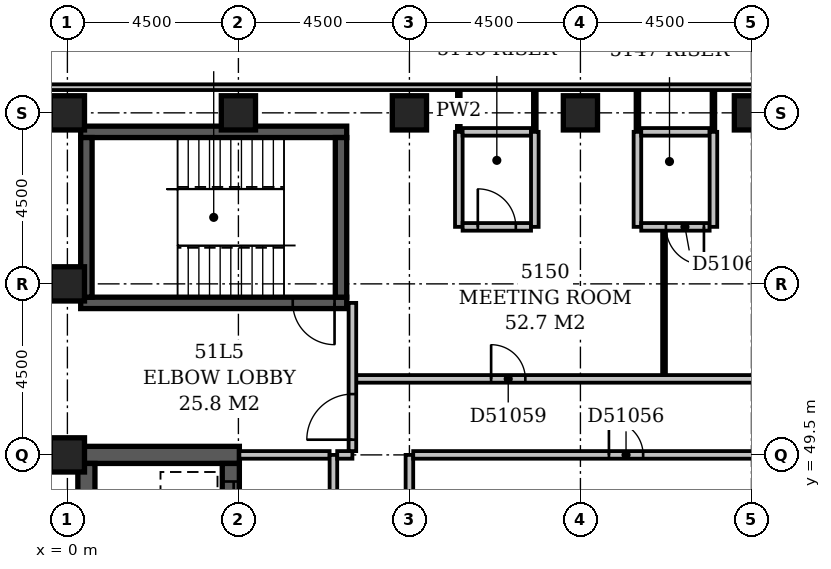
"""IFC4 building model, lengths in metres.
Left out: names, types, materials, properties, quantities, classifications, styles, units other than length and angle.
Written with IfcOpenShell. Run it as: python <this file> out.ifc"""

import sys

from ifc_helpers import new_model, si_unit, direction, frame, frame_2d, origin, origin_2d, place, context, subcontext, project, spatial, rectangle, extrude, element, fill, save


model = new_model("IFC4")
c1 = context("Model", 3, precision=1e-05, world=origin(), true_north=direction((0.0, 1.0)))
c2 = subcontext(c1, "Body", "Model", "MODEL_VIEW")
j1 = project(units=[si_unit("LENGTHUNIT", "METRE"), si_unit("PLANEANGLEUNIT", "RADIAN")], contexts=[c1])
p1 = place(None, origin())
s1 = spatial("IfcSite", under=j1, at=p1, CompositionType="ELEMENT")
p2 = place(p1, origin())
s2 = spatial("IfcBuilding", under=s1, at=p2, CompositionType="ELEMENT")
p3 = place(p2, frame((0.0, 0.0, 200.6)))
s3 = spatial("IfcBuildingStorey", under=s2, at=p3, CompositionType="ELEMENT", Elevation=200.6)
p4 = place(p3, frame((0.275, 49.5, -0.3), z_axis=(0.0, 0.0, 1.0), x_axis=(1.0, 0.0, 0.0)))
e1 = element("IfcWall", 1, at=p4, inside=s3, PredefinedType="SHEAR", context=c2, shape_type="SweptSolid", body=[
    extrude(rectangle(XDim=4.25, YDim=0.45, at=frame_2d((2.125, 0.0))), origin(), (0.0, 0.0, 1.0), 3.6),
])
p5 = place(p3, frame((0.35, 53.5, -0.3), z_axis=(0.0, 0.0, 1.0), x_axis=(1.0, 0.0, 0.0)))
e2 = element("IfcWall", 2, at=p5, inside=s3, PredefinedType="SHEAR", context=c2, shape_type="SweptSolid", body=[
    extrude(rectangle(XDim=7.0, YDim=0.3, at=frame_2d((3.5, 0.0))), origin(), (0.0, 0.0, 1.0), 3.6),
])
p6 = place(p5, frame((5.58, 0.0, 0.3)))
e3 = element("IfcOpeningElement", 3, at=p6, cuts=e2, PredefinedType="OPENING", context=c2, shape_type="SweptSolid", body=[
    extrude(rectangle(XDim=1.1, YDim=2.1, at=frame_2d((0.55, 1.05))), frame((0.0, 0.162, 0.0), z_axis=(0.0, -1.0, 0.0), x_axis=(1.0, 0.0, 0.0)), (0.0, 0.0, 1.0), 0.324),
])
p7 = place(p3, frame((0.35, 58.0, -0.3), z_axis=(0.0, 0.0, 1.0), x_axis=(1.0, 0.0, 0.0)))
e4 = element("IfcWall", 4, at=p7, inside=s3, PredefinedType="SHEAR", context=c2, shape_type="SweptSolid", body=[
    extrude(rectangle(XDim=7.0, YDim=0.3, at=frame_2d((3.5, 0.0))), origin(), (0.0, 0.0, 1.0), 3.6),
])
p8 = place(p3, frame((0.5, 27.15, -0.3), z_axis=(0.0, 0.0, 1.0), x_axis=(0.0, 1.0, 0.0)))
e5 = element("IfcWall", 5, at=p8, inside=s3, PredefinedType="SHEAR", context=c2, shape_type="SweptSolid", body=[
    extrude(rectangle(XDim=22.125, YDim=0.45, at=frame_2d((11.062, 0.0))), origin(), (0.0, 0.0, 1.0), 3.6),
])
p9 = place(p3, frame((0.5, 53.65, -0.3), z_axis=(0.0, 0.0, 1.0), x_axis=(0.0, 1.0, 0.0)))
e6 = element("IfcWall", 6, at=p9, inside=s3, PredefinedType="SHEAR", context=c2, shape_type="SweptSolid", body=[
    extrude(rectangle(XDim=4.2, YDim=0.3, at=frame_2d((2.1, 0.0))), origin(), (0.0, 0.0, 1.0), 3.6),
])
p10 = place(p3, frame((4.3, 27.15, -0.3), z_axis=(0.0, 0.0, 1.0), x_axis=(0.0, 1.0, 0.0)))
e7 = element("IfcWall", 7, at=p10, inside=s3, PredefinedType="SHEAR", context=c2, shape_type="SweptSolid", body=[
    extrude(rectangle(XDim=22.125, YDim=0.45, at=frame_2d((11.062, 0.0))), origin(), (0.0, 0.0, 1.0), 3.6),
])
p11 = place(p10, frame((3.05, 0.0, 0.3)))
e8 = element("IfcOpeningElement", 8, at=p11, cuts=e7, PredefinedType="OPENING", context=c2, shape_type="SweptSolid", body=[
    extrude(rectangle(XDim=1.1, YDim=2.1, at=frame_2d((0.55, 1.05))), frame((0.0, 0.237, 0.0), z_axis=(0.0, -1.0, 0.0), x_axis=(1.0, 0.0, 0.0)), (0.0, 0.0, 1.0), 0.474),
])
p12 = place(p10, frame((0.55, 0.0, 0.3)))
e9 = element("IfcOpeningElement", 9, at=p12, cuts=e7, PredefinedType="OPENING", context=c2, shape_type="SweptSolid", body=[
    extrude(rectangle(XDim=1.1, YDim=2.1, at=frame_2d((0.55, 1.05))), frame((0.0, 0.237, 0.0), z_axis=(0.0, -1.0, 0.0), x_axis=(1.0, 0.0, 0.0)), (0.0, 0.0, 1.0), 0.474),
])
p13 = place(p10, frame((20.55, 0.0, 0.3)))
e10 = element("IfcOpeningElement", 10, at=p13, cuts=e7, PredefinedType="OPENING", context=c2, shape_type="SweptSolid", body=[
    extrude(rectangle(XDim=1.1, YDim=2.1, at=frame_2d((0.55, 1.05))), frame((0.0, 0.237, 0.0), z_axis=(0.0, -1.0, 0.0), x_axis=(1.0, 0.0, 0.0)), (0.0, 0.0, 1.0), 0.474),
])
p14 = place(p10, frame((18.05, 0.0, 0.3)))
e11 = element("IfcOpeningElement", 11, at=p14, cuts=e7, PredefinedType="OPENING", context=c2, shape_type="SweptSolid", body=[
    extrude(rectangle(XDim=1.1, YDim=2.1, at=frame_2d((0.55, 1.05))), frame((0.0, 0.237, 0.0), z_axis=(0.0, -1.0, 0.0), x_axis=(1.0, 0.0, 0.0)), (0.0, 0.0, 1.0), 0.474),
])
p15 = place(p10, frame((15.55, 0.0, 0.3)))
e12 = element("IfcOpeningElement", 12, at=p15, cuts=e7, PredefinedType="OPENING", context=c2, shape_type="SweptSolid", body=[
    extrude(rectangle(XDim=1.1, YDim=2.1, at=frame_2d((0.55, 1.05))), frame((0.0, 0.237, 0.0), z_axis=(0.0, -1.0, 0.0), x_axis=(1.0, 0.0, 0.0)), (0.0, 0.0, 1.0), 0.474),
])
p16 = place(p10, frame((13.05, 0.0, 0.3)))
e13 = element("IfcOpeningElement", 13, at=p16, cuts=e7, PredefinedType="OPENING", context=c2, shape_type="SweptSolid", body=[
    extrude(rectangle(XDim=1.1, YDim=2.1, at=frame_2d((0.55, 1.05))), frame((0.0, 0.237, 0.0), z_axis=(0.0, -1.0, 0.0), x_axis=(1.0, 0.0, 0.0)), (0.0, 0.0, 1.0), 0.474),
])
p17 = place(p10, frame((10.55, 0.0, 0.3)))
e14 = element("IfcOpeningElement", 14, at=p17, cuts=e7, PredefinedType="OPENING", context=c2, shape_type="SweptSolid", body=[
    extrude(rectangle(XDim=1.1, YDim=2.1, at=frame_2d((0.55, 1.05))), frame((0.0, 0.237, 0.0), z_axis=(0.0, -1.0, 0.0), x_axis=(1.0, 0.0, 0.0)), (0.0, 0.0, 1.0), 0.474),
])
p18 = place(p10, frame((8.05, 0.0, 0.3)))
e15 = element("IfcOpeningElement", 15, at=p18, cuts=e7, PredefinedType="OPENING", context=c2, shape_type="SweptSolid", body=[
    extrude(rectangle(XDim=1.1, YDim=2.1, at=frame_2d((0.55, 1.05))), frame((0.0, 0.237, 0.0), z_axis=(0.0, -1.0, 0.0), x_axis=(1.0, 0.0, 0.0)), (0.0, 0.0, 1.0), 0.474),
])
p19 = place(p10, frame((5.55, 0.0, 0.3)))
e16 = element("IfcOpeningElement", 16, at=p19, cuts=e7, PredefinedType="OPENING", context=c2, shape_type="SweptSolid", body=[
    extrude(rectangle(XDim=1.1, YDim=2.1, at=frame_2d((0.55, 1.05))), frame((0.0, 0.237, 0.0), z_axis=(0.0, -1.0, 0.0), x_axis=(1.0, 0.0, 0.0)), (0.0, 0.0, 1.0), 0.474),
])
p20 = place(p3, frame((7.2, 53.65, -0.3), z_axis=(0.0, 0.0, 1.0), x_axis=(0.0, 1.0, 0.0)))
e17 = element("IfcWall", 17, at=p20, inside=s3, PredefinedType="SHEAR", context=c2, shape_type="SweptSolid", body=[
    extrude(rectangle(XDim=4.2, YDim=0.3, at=frame_2d((2.1, 0.0))), origin(), (0.0, 0.0, 1.0), 3.6),
])
for number, where, z_axis, x_axis in (
    (18, (0.0, 49.5, -0.3), (0.0, 0.0, 1.0), (1.0, 0.0, 0.0)),
    (19, (0.0, 54.0, -0.3), (0.0, 0.0, 1.0), (1.0, 0.0, 0.0)),
    (20, (0.0, 58.5, -0.3), (0.0, 0.0, 1.0), (1.0, 0.0, 0.0)),
    (21, (4.5, 58.5, -0.3), (0.0, 0.0, 1.0), (1.0, 0.0, 0.0)),
    (22, (9.0, 58.5, -0.3), (0.0, 0.0, 1.0), (1.0, 0.0, 0.0)),
    (23, (13.5, 58.5, -0.3), (0.0, 0.0, 1.0), (1.0, 0.0, 0.0)),
    (24, (18.0, 58.5, -0.3), (0.0, 0.0, 1.0), (1.0, 0.0, 0.0)),
):
    element("IfcColumn", number, at=place(p3, frame(where, z_axis=z_axis, x_axis=x_axis)), inside=s3, PredefinedType="COLUMN", context=c2, shape_type="SweptSolid", body=[
        extrude(rectangle(XDim=0.9, YDim=0.9, at=origin_2d()), origin(), (0.0, 0.0, 1.0), 3.6),
    ])
p21 = place(p3, frame((50.1, 59.175, 0.0), z_axis=(0.0, 0.0, 1.0), x_axis=(-1.0, 0.0, 0.0)))
e25 = element("IfcWall", 25, at=p21, inside=s3, PredefinedType="STANDARD", context=c2, shape_type="SweptSolid", body=[
    extrude(rectangle(XDim=50.85, YDim=0.15, at=frame_2d((25.425, 0.0))), origin(), (0.0, 0.0, 1.0), 2.7),
])
p22 = place(p3, frame((7.0, 34.6, 0.0), z_axis=(0.0, 0.0, 1.0), x_axis=(0.0, 1.0, 0.0)))
e26 = element("IfcWall", 26, at=p22, inside=s3, PredefinedType="PARTITIONING", context=c2, shape_type="SweptSolid", body=[
    extrude(rectangle(XDim=14.9, YDim=0.2, at=frame_2d((7.45, 0.0))), origin(), (0.0, 0.0, 1.0), 3.3),
])
p23 = place(p22, frame((2.8, 0.0, 0.0)))
e27 = element("IfcOpeningElement", 27, at=p23, cuts=e26, PredefinedType="OPENING", context=c2, shape_type="SweptSolid", body=[
    extrude(rectangle(XDim=1.2, YDim=2.1, at=frame_2d((0.6, 1.05))), frame((0.0, 0.112, 0.0), z_axis=(0.0, -1.0, 0.0), x_axis=(1.0, 0.0, 0.0)), (0.0, 0.0, 1.0), 0.224),
])
p24 = place(p22, frame((9.8, 0.0, 0.0)))
e28 = element("IfcOpeningElement", 28, at=p24, cuts=e26, PredefinedType="OPENING", context=c2, shape_type="SweptSolid", body=[
    extrude(rectangle(XDim=1.2, YDim=2.1, at=frame_2d((0.6, 1.05))), frame((0.0, 0.112, 0.0), z_axis=(0.0, -1.0, 0.0), x_axis=(1.0, 0.0, 0.0)), (0.0, 0.0, 1.0), 0.224),
])
p25 = place(p3, frame((4.525, 49.5, 0.0), z_axis=(0.0, 0.0, 1.0), x_axis=(1.0, 0.0, 0.0)))
e29 = element("IfcWall", 29, at=p25, inside=s3, PredefinedType="PARTITIONING", context=c2, shape_type="SweptSolid", body=[
    extrude(rectangle(XDim=2.375, YDim=0.2, at=frame_2d((1.188, 0.0))), origin(), (0.0, 0.0, 1.0), 3.3),
])
p26 = place(p3, frame((7.1, 49.5, 0.0), z_axis=(0.0, 0.0, 1.0), x_axis=(1.0, 0.0, 0.0)))
e30 = element("IfcWall", 30, at=p26, inside=s3, PredefinedType="PARTITIONING", context=c2, shape_type="SweptSolid", body=[
    extrude(rectangle(XDim=0.4, YDim=0.2, at=frame_2d((0.2, 0.0))), origin(), (0.0, 0.0, 1.0), 3.3),
])
p27 = place(p3, frame((7.5, 49.6, 0.0), z_axis=(0.0, 0.0, 1.0), x_axis=(0.0, 1.0, 0.0)))
e31 = element("IfcWall", 31, at=p27, inside=s3, PredefinedType="PARTITIONING", context=c2, shape_type="SweptSolid", body=[
    extrude(rectangle(XDim=3.9, YDim=0.2, at=frame_2d((1.95, 0.0))), origin(), (0.0, 0.0, 1.0), 3.3),
])
p28 = place(p27, frame((0.3, 0.0, 0.0)))
e32 = element("IfcOpeningElement", 32, at=p28, cuts=e31, PredefinedType="OPENING", context=c2, shape_type="SweptSolid", body=[
    extrude(rectangle(XDim=1.2, YDim=2.1, at=frame_2d((0.6, 1.05))), frame((0.0, 0.112, 0.0), z_axis=(0.0, -1.0, 0.0), x_axis=(1.0, 0.0, 0.0)), (0.0, 0.0, 1.0), 0.224),
])
p29 = place(p3, frame((9.0, 38.0, 0.0), z_axis=(0.0, 0.0, 1.0), x_axis=(0.0, 1.0, 0.0)))
e33 = element("IfcWall", 33, at=p29, inside=s3, PredefinedType="PARTITIONING", context=c2, shape_type="SweptSolid", body=[
    extrude(rectangle(XDim=11.5, YDim=0.2, at=frame_2d((5.75, 0.0))), origin(), (0.0, 0.0, 1.0), 3.3),
])
p30 = place(p29, frame((2.375, 0.0, 0.0)))
e34 = element("IfcOpeningElement", 34, at=p30, cuts=e33, PredefinedType="OPENING", context=c2, shape_type="SweptSolid", body=[
    extrude(rectangle(XDim=0.9, YDim=2.1, at=frame_2d((0.45, 1.05))), frame((0.0, 0.112, 0.0), z_axis=(0.0, -1.0, 0.0), x_axis=(1.0, 0.0, 0.0)), (0.0, 0.0, 1.0), 0.224),
])
p31 = place(p3, frame((9.1, 49.5, 0.0), z_axis=(0.0, 0.0, 1.0), x_axis=(1.0, 0.0, 0.0)))
e35 = element("IfcWall", 35, at=p31, inside=s3, PredefinedType="PARTITIONING", context=c2, shape_type="SweptSolid", body=[
    extrude(rectangle(XDim=11.3, YDim=0.2, at=frame_2d((5.65, 0.0))), origin(), (0.0, 0.0, 1.0), 3.3),
])
p32 = place(p31, frame((5.15, 0.0, 0.0)))
e36 = element("IfcOpeningElement", 36, at=p32, cuts=e35, PredefinedType="OPENING", context=c2, shape_type="SweptSolid", body=[
    extrude(rectangle(XDim=0.9, YDim=2.1, at=frame_2d((0.45, 1.05))), frame((0.0, 0.112, 0.0), z_axis=(0.0, -1.0, 0.0), x_axis=(1.0, 0.0, 0.0)), (0.0, 0.0, 1.0), 0.224),
])
p33 = place(p3, frame((7.6, 51.5, 0.0), z_axis=(0.0, 0.0, 1.0), x_axis=(1.0, 0.0, 0.0)))
e37 = element("IfcWall", 37, at=p33, inside=s3, PredefinedType="PARTITIONING", context=c2, shape_type="SweptSolid", body=[
    extrude(rectangle(XDim=15.3, YDim=0.2, at=frame_2d((7.65, 0.0))), origin(), (0.0, 0.0, 1.0), 3.3),
])
p34 = place(p33, frame((3.55, 0.0, 0.0)))
e38 = element("IfcOpeningElement", 38, at=p34, cuts=e37, PredefinedType="OPENING", context=c2, shape_type="SweptSolid", body=[
    extrude(rectangle(XDim=0.9, YDim=2.1, at=frame_2d((0.45, 1.05))), frame((0.0, 0.112, 0.0), z_axis=(0.0, -1.0, 0.0), x_axis=(1.0, 0.0, 0.0)), (0.0, 0.0, 1.0), 0.224),
])
p35 = place(p33, frame((11.3, 0.0, 0.0)))
e39 = element("IfcOpeningElement", 39, at=p35, cuts=e37, PredefinedType="OPENING", context=c2, shape_type="SweptSolid", body=[
    extrude(rectangle(XDim=0.9, YDim=2.1, at=frame_2d((0.45, 1.05))), frame((0.0, 0.112, 0.0), z_axis=(0.0, -1.0, 0.0), x_axis=(1.0, 0.0, 0.0)), (0.0, 0.0, 1.0), 0.224),
])
p36 = place(p3, frame((15.7, 51.6, 0.0), z_axis=(0.0, 0.0, 1.0), x_axis=(0.0, 1.0, 0.0)))
e40 = element("IfcWall", 40, at=p36, inside=s3, PredefinedType="PARTITIONING", context=c2, shape_type="SweptSolid", body=[
    extrude(rectangle(XDim=3.8, YDim=0.1, at=frame_2d((1.9, 0.0))), origin(), (0.0, 0.0, 1.0), 3.3),
])
p37 = place(p3, frame((10.3, 55.5, 0.0), z_axis=(0.0, 0.0, 1.0), x_axis=(0.0, 1.0, 0.0)))
e41 = element("IfcWall", 41, at=p37, inside=s3, PredefinedType="PARTITIONING", context=c2, shape_type="SweptSolid", body=[
    extrude(rectangle(XDim=2.5, YDim=0.2, at=frame_2d((1.25, 0.0))), origin(), (0.0, 0.0, 1.0), 3.3),
])
p38 = place(p3, frame((10.4, 55.5, 0.0), z_axis=(0.0, 0.0, 1.0), x_axis=(1.0, 0.0, 0.0)))
e42 = element("IfcWall", 42, at=p38, inside=s3, PredefinedType="PARTITIONING", context=c2, shape_type="SweptSolid", body=[
    extrude(rectangle(XDim=1.8, YDim=0.2, at=frame_2d((0.9, 0.0))), origin(), (0.0, 0.0, 1.0), 3.3),
])
p39 = place(p38, frame((0.4, 0.0, 0.0)))
e43 = element("IfcOpeningElement", 43, at=p39, cuts=e42, PredefinedType="OPENING", context=c2, shape_type="SweptSolid", body=[
    extrude(rectangle(XDim=1.0, YDim=2.1, at=frame_2d((0.5, 1.05))), frame((0.0, 0.112, 0.0), z_axis=(0.0, -1.0, 0.0), x_axis=(1.0, 0.0, 0.0)), (0.0, 0.0, 1.0), 0.224),
])
for number, where, z_axis, x_axis in (
    (44, (12.3, 55.5, 0.0), (0.0, 0.0, 1.0), (0.0, 1.0, 0.0)),
    (45, (15.0, 55.5, 0.0), (0.0, 0.0, 1.0), (0.0, 1.0, 0.0)),
):
    element("IfcWall", number, at=place(p3, frame(where, z_axis=z_axis, x_axis=x_axis)), inside=s3, PredefinedType="PARTITIONING", context=c2, shape_type="SweptSolid", body=[
        extrude(rectangle(XDim=2.5, YDim=0.2, at=frame_2d((1.25, 0.0))), origin(), (0.0, 0.0, 1.0), 3.3),
    ])
p40 = place(p3, frame((15.1, 55.5, 0.0), z_axis=(0.0, 0.0, 1.0), x_axis=(1.0, 0.0, 0.0)))
e46 = element("IfcWall", 46, at=p40, inside=s3, PredefinedType="PARTITIONING", context=c2, shape_type="SweptSolid", body=[
    extrude(rectangle(XDim=1.8, YDim=0.2, at=frame_2d((0.9, 0.0))), origin(), (0.0, 0.0, 1.0), 3.3),
])
p41 = place(p40, frame((0.65, 0.0, 0.0)))
e47 = element("IfcOpeningElement", 47, at=p41, cuts=e46, PredefinedType="OPENING", context=c2, shape_type="SweptSolid", body=[
    extrude(rectangle(XDim=1.0, YDim=2.1, at=frame_2d((0.5, 1.05))), frame((0.0, 0.112, 0.0), z_axis=(0.0, -1.0, 0.0), x_axis=(1.0, 0.0, 0.0)), (0.0, 0.0, 1.0), 0.224),
])
p42 = place(p3, frame((17.0, 55.5, 0.0), z_axis=(0.0, 0.0, 1.0), x_axis=(0.0, 1.0, 0.0)))
e48 = element("IfcWall", 48, at=p42, inside=s3, PredefinedType="PARTITIONING", context=c2, shape_type="SweptSolid", body=[
    extrude(rectangle(XDim=2.5, YDim=0.2, at=frame_2d((1.25, 0.0))), origin(), (0.0, 0.0, 1.0), 3.3),
])
p43 = place(p3, frame((10.3, 58.0, 0.0), z_axis=(0.0, 0.0, 1.0), x_axis=(0.0, 1.0, 0.0)))
e49 = element("IfcWall", 49, at=p43, inside=s3, PredefinedType="PARTITIONING", context=c2, shape_type="SweptSolid", body=[
    extrude(rectangle(XDim=1.1, YDim=0.1, at=frame_2d((0.55, 0.0))), origin(), (0.0, 0.0, 1.0), 3.3),
])
p44 = place(p3, frame((10.4, 58.0, 0.0), z_axis=(0.0, 0.0, 1.0), x_axis=(1.0, 0.0, 0.0)))
e50 = element("IfcWall", 50, at=p44, inside=s3, PredefinedType="PARTITIONING", context=c2, shape_type="SweptSolid", body=[
    extrude(rectangle(XDim=1.8, YDim=0.2, at=frame_2d((0.9, 0.0))), origin(), (0.0, 0.0, 1.0), 3.3),
])
for number, where, z_axis, x_axis in (
    (51, (12.3, 58.0, 0.0), (0.0, 0.0, 1.0), (0.0, 1.0, 0.0)),
    (52, (15.0, 58.0, 0.0), (0.0, 0.0, 1.0), (0.0, 1.0, 0.0)),
):
    element("IfcWall", number, at=place(p3, frame(where, z_axis=z_axis, x_axis=x_axis)), inside=s3, PredefinedType="PARTITIONING", context=c2, shape_type="SweptSolid", body=[
        extrude(rectangle(XDim=1.1, YDim=0.1, at=frame_2d((0.55, 0.0))), origin(), (0.0, 0.0, 1.0), 3.3),
    ])
p45 = place(p3, frame((15.1, 58.0, 0.0), z_axis=(0.0, 0.0, 1.0), x_axis=(1.0, 0.0, 0.0)))
e53 = element("IfcWall", 53, at=p45, inside=s3, PredefinedType="PARTITIONING", context=c2, shape_type="SweptSolid", body=[
    extrude(rectangle(XDim=1.8, YDim=0.2, at=frame_2d((0.9, 0.0))), origin(), (0.0, 0.0, 1.0), 3.3),
])
p46 = place(p3, frame((17.0, 58.0, 0.0), z_axis=(0.0, 0.0, 1.0), x_axis=(0.0, 1.0, 0.0)))
e54 = element("IfcWall", 54, at=p46, inside=s3, PredefinedType="PARTITIONING", context=c2, shape_type="SweptSolid", body=[
    extrude(rectangle(XDim=1.1, YDim=0.1, at=frame_2d((0.55, 0.0))), origin(), (0.0, 0.0, 1.0), 3.3),
])
p47 = place(p28, origin())
e55 = element("IfcDoor", 55, at=p47, inside=s3, OperationType="SINGLE_SWING_LEFT", PredefinedType="DOOR", context=c2, shape_type="SweptSolid", body=[
    extrude(rectangle(XDim=1.2, YDim=2.1, at=frame_2d((0.6, 1.05))), frame((0.0, 0.025, 0.0), z_axis=(0.0, -1.0, 0.0), x_axis=(1.0, 0.0, 0.0)), (0.0, 0.0, 1.0), 0.05),
])
fill(e32, e55)
p48 = place(p13, origin())
e56 = element("IfcDoor", 56, at=p48, inside=s3, OperationType="SLIDING_TO_LEFT", PredefinedType="DOOR", context=c2, shape_type="SweptSolid", body=[
    extrude(rectangle(XDim=1.1, YDim=2.1, at=frame_2d((0.55, 1.05))), frame((0.0, 0.025, 0.0), z_axis=(0.0, -1.0, 0.0), x_axis=(1.0, 0.0, 0.0)), (0.0, 0.0, 1.0), 0.05),
])
fill(e10, e56)
p49 = place(p6, origin())
e57 = element("IfcDoor", 57, at=p49, inside=s3, OperationType="SINGLE_SWING_RIGHT", PredefinedType="DOOR", context=c2, shape_type="SweptSolid", body=[
    extrude(rectangle(XDim=1.1, YDim=2.1, at=frame_2d((0.55, 1.05))), frame((0.0, 0.025, 0.0), z_axis=(0.0, -1.0, 0.0), x_axis=(1.0, 0.0, 0.0)), (0.0, 0.0, 1.0), 0.05),
])
fill(e3, e57)
p50 = place(p32, origin())
e58 = element("IfcDoor", 58, at=p50, inside=s3, OperationType="SINGLE_SWING_LEFT", PredefinedType="DOOR", context=c2, shape_type="SweptSolid", body=[
    extrude(rectangle(XDim=0.9, YDim=2.1, at=frame_2d((0.45, 1.05))), frame((0.0, 0.025, 0.0), z_axis=(0.0, -1.0, 0.0), x_axis=(1.0, 0.0, 0.0)), (0.0, 0.0, 1.0), 0.05),
])
fill(e36, e58)
p51 = place(p34, origin())
e59 = element("IfcDoor", 59, at=p51, inside=s3, OperationType="SINGLE_SWING_LEFT", PredefinedType="DOOR", context=c2, shape_type="SweptSolid", body=[
    extrude(rectangle(XDim=0.9, YDim=2.1, at=frame_2d((0.45, 1.05))), frame((0.0, 0.025, 0.0), z_axis=(0.0, -1.0, 0.0), x_axis=(1.0, 0.0, 0.0)), (0.0, 0.0, 1.0), 0.05),
])
fill(e38, e59)
p52 = place(p39, origin())
e60 = element("IfcDoor", 60, at=p52, inside=s3, OperationType="SINGLE_SWING_LEFT", PredefinedType="DOOR", context=c2, shape_type="SweptSolid", body=[
    extrude(rectangle(XDim=1.0, YDim=2.1, at=frame_2d((0.5, 1.05))), frame((0.0, 0.025, 0.0), z_axis=(0.0, -1.0, 0.0), x_axis=(1.0, 0.0, 0.0)), (0.0, 0.0, 1.0), 0.05),
])
fill(e43, e60)
p53 = place(p41, origin())
e61 = element("IfcDoor", 61, at=p53, inside=s3, OperationType="SINGLE_SWING_RIGHT", PredefinedType="DOOR", context=c2, shape_type="SweptSolid", body=[
    extrude(rectangle(XDim=1.0, YDim=2.1, at=frame_2d((0.5, 1.05))), frame((0.0, 0.025, 0.0), z_axis=(0.0, -1.0, 0.0), x_axis=(1.0, 0.0, 0.0)), (0.0, 0.0, 1.0), 0.05),
])
fill(e47, e61)
save(model, sys.argv[1])
